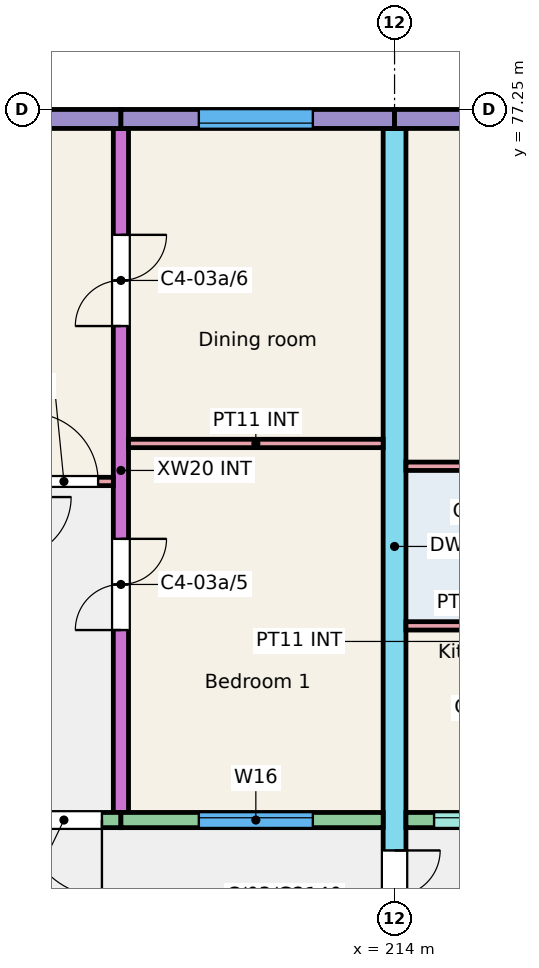
"""IFC4 building model, lengths in metres.
Left out: names, types, materials, properties, quantities, classifications, styles, units other than length and angle.
Written with IfcOpenShell. Run it as: python <this file> out.ifc"""

import sys

from ifc_helpers import new_model, si_unit, direction, frame, frame_2d, origin, place, context, subcontext, project, spatial, rectangle, extrude, element, fill, save


model = new_model("IFC4")
c1 = context("Model", 3, precision=1e-05, world=origin(), true_north=direction((0.0, 1.0)))
c2 = subcontext(c1, "Body", "Model", "MODEL_VIEW")
j1 = project(units=[si_unit("LENGTHUNIT", "METRE"), si_unit("PLANEANGLEUNIT", "RADIAN")], contexts=[c1])
p1 = place(None, origin())
s1 = spatial("IfcSite", under=j1, at=p1, CompositionType="ELEMENT")
p2 = place(p1, origin())
s2 = spatial("IfcBuilding", under=s1, at=p2, CompositionType="ELEMENT")
p3 = place(p2, frame((0.0, 0.0, 9.0)))
s3 = spatial("IfcBuildingStorey", under=s2, at=p3, CompositionType="ELEMENT", Elevation=9.0)
p4 = place(p3, frame((210.4, 68.0, 0.0), z_axis=(0.0, 0.0, 1.0), x_axis=(0.0, 1.0, 0.0)))
e1 = element("IfcWall", 1, at=p4, inside=s3, PredefinedType="SHEAR", context=c2, shape_type="SweptSolid", body=[
    extrude(rectangle(XDim=9.0, YDim=0.2, at=frame_2d((4.5, 0.0))), origin(), (0.0, 0.0, 1.0), 3.0),
])
p5 = place(p4, frame((2.4, 0.0, 0.0)))
e2 = element("IfcOpeningElement", 2, at=p5, cuts=e1, PredefinedType="OPENING", context=c2, shape_type="SweptSolid", body=[
    extrude(rectangle(XDim=1.2, YDim=2.1, at=frame_2d((0.6, 1.05))), frame((0.0, 0.11, 0.0), z_axis=(0.0, -1.0, 0.0), x_axis=(1.0, 0.0, 0.0)), (0.0, 0.0, 1.0), 0.22),
])
p6 = place(p4, frame((6.4, 0.0, 0.0)))
e3 = element("IfcOpeningElement", 3, at=p6, cuts=e1, PredefinedType="OPENING", context=c2, shape_type="SweptSolid", body=[
    extrude(rectangle(XDim=1.2, YDim=2.1, at=frame_2d((0.6, 1.05))), frame((0.0, 0.11, 0.0), z_axis=(0.0, -1.0, 0.0), x_axis=(1.0, 0.0, 0.0)), (0.0, 0.0, 1.0), 0.22),
])
p7 = place(p3, frame((214.0, 66.0, 0.0), z_axis=(0.0, 0.0, 1.0), x_axis=(0.0, 1.0, 0.0)))
e4 = element("IfcWall", 4, at=p7, inside=s3, PredefinedType="SHEAR", context=c2, shape_type="SweptSolid", body=[
    extrude(rectangle(XDim=11.0, YDim=0.3, at=frame_2d((5.5, 0.0))), origin(), (0.0, 0.0, 1.0), 3.0),
])
p8 = place(p7, frame((0.3, 0.0, 0.0)))
e5 = element("IfcOpeningElement", 5, at=p8, cuts=e4, PredefinedType="OPENING", context=c2, shape_type="SweptSolid", body=[
    extrude(rectangle(XDim=1.2, YDim=2.1, at=frame_2d((0.6, 1.05))), frame((0.0, 0.16, 0.0), z_axis=(0.0, -1.0, 0.0), x_axis=(1.0, 0.0, 0.0)), (0.0, 0.0, 1.0), 0.32),
])
p9 = place(p3, frame((206.8, 77.125, 0.0), z_axis=(0.0, 0.0, 1.0), x_axis=(1.0, 0.0, 0.0)))
e6 = element("IfcWall", 6, at=p9, inside=s3, PredefinedType="SOLIDWALL", context=c2, shape_type="SweptSolid", body=[
    extrude(rectangle(XDim=3.6, YDim=0.25, at=frame_2d((1.8, 0.0))), origin(), (0.0, 0.0, 1.0), 3.0),
])
p10 = place(p9, frame((1.05, 0.0, 0.9)))
e7 = element("IfcOpeningElement", 7, at=p10, cuts=e6, PredefinedType="OPENING", context=c2, shape_type="SweptSolid", body=[
    extrude(rectangle(XDim=1.5, YDim=1.5, at=frame_2d((0.75, 0.75))), frame((0.0, 0.135, 0.0), z_axis=(0.0, -1.0, 0.0), x_axis=(1.0, 0.0, 0.0)), (0.0, 0.0, 1.0), 0.27),
])
p11 = place(p3, frame((206.8, 67.9, 0.0), z_axis=(0.0, 0.0, 1.0), x_axis=(1.0, 0.0, 0.0)))
e8 = element("IfcWall", 8, at=p11, inside=s3, PredefinedType="SOLIDWALL", context=c2, shape_type="SweptSolid", body=[
    extrude(rectangle(XDim=3.6, YDim=0.2, at=frame_2d((1.8, 0.0))), origin(), (0.0, 0.0, 1.0), 3.0),
])
p12 = place(p11, frame((0.495, 0.0, 1.1)))
e9 = element("IfcOpeningElement", 9, at=p12, cuts=e8, PredefinedType="OPENING", context=c2, shape_type="SweptSolid", body=[
    extrude(rectangle(XDim=1.2, YDim=1.3, at=frame_2d((0.6, 0.65))), frame((0.0, 0.11, 0.0), z_axis=(0.0, -1.0, 0.0), x_axis=(1.0, 0.0, 0.0)), (0.0, 0.0, 1.0), 0.22),
])
p13 = place(p11, frame((2.35, 0.0, 0.0)))
e10 = element("IfcOpeningElement", 10, at=p13, cuts=e8, PredefinedType="OPENING", context=c2, shape_type="SweptSolid", body=[
    extrude(rectangle(XDim=1.0, YDim=2.1, at=frame_2d((0.5, 1.05))), frame((0.0, 0.11, 0.0), z_axis=(0.0, -1.0, 0.0), x_axis=(1.0, 0.0, 0.0)), (0.0, 0.0, 1.0), 0.22),
])
p14 = place(p3, frame((210.4, 77.125, 0.0), z_axis=(0.0, 0.0, 1.0), x_axis=(1.0, 0.0, 0.0)))
e11 = element("IfcWall", 11, at=p14, inside=s3, PredefinedType="SOLIDWALL", context=c2, shape_type="SweptSolid", body=[
    extrude(rectangle(XDim=3.6, YDim=0.25, at=frame_2d((1.8, 0.0))), origin(), (0.0, 0.0, 1.0), 3.0),
])
p15 = place(p14, frame((1.025, 0.0, 0.9)))
e12 = element("IfcOpeningElement", 12, at=p15, cuts=e11, PredefinedType="OPENING", context=c2, shape_type="SweptSolid", body=[
    extrude(rectangle(XDim=1.5, YDim=1.5, at=frame_2d((0.75, 0.75))), frame((0.0, 0.135, 0.0), z_axis=(0.0, -1.0, 0.0), x_axis=(1.0, 0.0, 0.0)), (0.0, 0.0, 1.0), 0.27),
])
p16 = place(p3, frame((210.4, 67.9, 0.0), z_axis=(0.0, 0.0, 1.0), x_axis=(1.0, 0.0, 0.0)))
e13 = element("IfcWall", 13, at=p16, inside=s3, PredefinedType="SOLIDWALL", context=c2, shape_type="SweptSolid", body=[
    extrude(rectangle(XDim=3.45, YDim=0.2, at=frame_2d((1.725, 0.0))), origin(), (0.0, 0.0, 1.0), 3.0),
])
p17 = place(p16, frame((1.025, 0.0, 0.9)))
e14 = element("IfcOpeningElement", 14, at=p17, cuts=e13, PredefinedType="OPENING", context=c2, shape_type="SweptSolid", body=[
    extrude(rectangle(XDim=1.5, YDim=1.5, at=frame_2d((0.75, 0.75))), frame((0.0, 0.11, 0.0), z_axis=(0.0, -1.0, 0.0), x_axis=(1.0, 0.0, 0.0)), (0.0, 0.0, 1.0), 0.22),
])
p18 = place(p3, frame((214.0, 77.125, 0.0), z_axis=(0.0, 0.0, 1.0), x_axis=(1.0, 0.0, 0.0)))
e15 = element("IfcWall", 15, at=p18, inside=s3, PredefinedType="SOLIDWALL", context=c2, shape_type="SweptSolid", body=[
    extrude(rectangle(XDim=3.6, YDim=0.25, at=frame_2d((1.8, 0.0))), origin(), (0.0, 0.0, 1.0), 3.0),
])
p19 = place(p18, frame((1.075, 0.0, 0.9)))
e16 = element("IfcOpeningElement", 16, at=p19, cuts=e15, PredefinedType="OPENING", context=c2, shape_type="SweptSolid", body=[
    extrude(rectangle(XDim=1.5, YDim=1.5, at=frame_2d((0.75, 0.75))), frame((0.0, 0.135, 0.0), z_axis=(0.0, -1.0, 0.0), x_axis=(1.0, 0.0, 0.0)), (0.0, 0.0, 1.0), 0.27),
])
p20 = place(p3, frame((214.15, 67.9, 0.0), z_axis=(0.0, 0.0, 1.0), x_axis=(1.0, 0.0, 0.0)))
e17 = element("IfcWall", 17, at=p20, inside=s3, PredefinedType="SOLIDWALL", context=c2, shape_type="SweptSolid", body=[
    extrude(rectangle(XDim=3.45, YDim=0.2, at=frame_2d((1.725, 0.0))), origin(), (0.0, 0.0, 1.0), 3.0),
])
p21 = place(p20, frame((0.37, 0.0, 1.1)))
e18 = element("IfcOpeningElement", 18, at=p21, cuts=e17, PredefinedType="OPENING", context=c2, shape_type="SweptSolid", body=[
    extrude(rectangle(XDim=1.2, YDim=1.3, at=frame_2d((0.6, 0.65))), frame((0.0, 0.11, 0.0), z_axis=(0.0, -1.0, 0.0), x_axis=(1.0, 0.0, 0.0)), (0.0, 0.0, 1.0), 0.22),
])
p22 = place(p20, frame((2.2, 0.0, 0.0)))
e19 = element("IfcOpeningElement", 19, at=p22, cuts=e17, PredefinedType="OPENING", context=c2, shape_type="SweptSolid", body=[
    extrude(rectangle(XDim=1.0, YDim=2.1, at=frame_2d((0.5, 1.05))), frame((0.0, 0.11, 0.0), z_axis=(0.0, -1.0, 0.0), x_axis=(1.0, 0.0, 0.0)), (0.0, 0.0, 1.0), 0.22),
])
p23 = place(p3, frame((206.9, 72.355, 0.0), z_axis=(0.0, 0.0, 1.0), x_axis=(1.0, 0.0, 0.0)))
e20 = element("IfcWall", 20, at=p23, inside=s3, PredefinedType="PARTITIONING", context=c2, shape_type="SweptSolid", body=[
    extrude(rectangle(XDim=3.4, YDim=0.11, at=frame_2d((1.7, 0.0))), origin(), (0.0, 0.0, 1.0), 2.8),
])
p24 = place(p23, frame((2.3, 0.0, 0.0)))
e21 = element("IfcOpeningElement", 21, at=p24, cuts=e20, PredefinedType="OPENING", context=c2, shape_type="SweptSolid", body=[
    extrude(rectangle(XDim=0.9, YDim=2.1, at=frame_2d((0.45, 1.05))), frame((0.0, 0.065, 0.0), z_axis=(0.0, -1.0, 0.0), x_axis=(1.0, 0.0, 0.0)), (0.0, 0.0, 1.0), 0.13),
])
p25 = place(p3, frame((210.5, 72.855, 0.0), z_axis=(0.0, 0.0, 1.0), x_axis=(1.0, 0.0, 0.0)))
e22 = element("IfcWall", 22, at=p25, inside=s3, PredefinedType="PARTITIONING", context=c2, shape_type="SweptSolid", body=[
    extrude(rectangle(XDim=3.35, YDim=0.11, at=frame_2d((1.675, 0.0))), origin(), (0.0, 0.0, 1.0), 2.8),
])
p26 = place(p3, frame((214.15, 70.455, 0.0), z_axis=(0.0, 0.0, 1.0), x_axis=(1.0, 0.0, 0.0)))
e23 = element("IfcWall", 23, at=p26, inside=s3, PredefinedType="PARTITIONING", context=c2, shape_type="SweptSolid", body=[
    extrude(rectangle(XDim=1.94, YDim=0.11, at=frame_2d((0.97, 0.0))), origin(), (0.0, 0.0, 1.0), 2.8),
])
p27 = place(p3, frame((214.15, 72.555, 0.0), z_axis=(0.0, 0.0, 1.0), x_axis=(1.0, 0.0, 0.0)))
e24 = element("IfcWall", 24, at=p27, inside=s3, PredefinedType="PARTITIONING", context=c2, shape_type="SweptSolid", body=[
    extrude(rectangle(XDim=3.35, YDim=0.11, at=frame_2d((1.675, 0.0))), origin(), (0.0, 0.0, 1.0), 2.8),
])
p28 = place(p27, frame((2.25, 0.0, 0.0)))
e25 = element("IfcOpeningElement", 25, at=p28, cuts=e24, PredefinedType="OPENING", context=c2, shape_type="SweptSolid", body=[
    extrude(rectangle(XDim=0.9, YDim=2.1, at=frame_2d((0.45, 1.05))), frame((0.0, 0.065, 0.0), z_axis=(0.0, -1.0, 0.0), x_axis=(1.0, 0.0, 0.0)), (0.0, 0.0, 1.0), 0.13),
])
p29 = place(p17, origin())
e26 = element("IfcWindow", 26, at=p29, inside=s3, PartitioningType="SINGLE_PANEL", PredefinedType="WINDOW", context=c2, shape_type="SweptSolid", body=[
    extrude(rectangle(XDim=1.5, YDim=1.5, at=frame_2d((0.75, 0.75))), frame((0.0, 0.06, 0.0), z_axis=(0.0, -1.0, 0.0), x_axis=(1.0, 0.0, 0.0)), (0.0, 0.0, 1.0), 0.06),
])
fill(e14, e26)
p30 = place(p15, origin())
e27 = element("IfcWindow", 27, at=p30, inside=s3, PartitioningType="SINGLE_PANEL", PredefinedType="WINDOW", context=c2, shape_type="SweptSolid", body=[
    extrude(rectangle(XDim=1.5, YDim=1.5, at=frame_2d((0.75, 0.75))), frame((0.0, -0.025, 0.0), z_axis=(0.0, -1.0, 0.0), x_axis=(1.0, 0.0, 0.0)), (0.0, 0.0, 1.0), 0.06),
])
fill(e12, e27)
p31 = place(p21, origin())
e28 = element("IfcWindow", 28, at=p31, inside=s3, PartitioningType="SINGLE_PANEL", PredefinedType="WINDOW", context=c2, shape_type="SweptSolid", body=[
    extrude(rectangle(XDim=1.2, YDim=1.3, at=frame_2d((0.6, 0.65))), frame((0.0, 0.06, 0.0), z_axis=(0.0, -1.0, 0.0), x_axis=(1.0, 0.0, 0.0)), (0.0, 0.0, 1.0), 0.06),
])
fill(e18, e28)
p32 = place(p13, origin())
e29 = element("IfcDoor", 29, at=p32, inside=s3, OperationType="SINGLE_SWING_RIGHT", PredefinedType="DOOR", context=c2, shape_type="SweptSolid", body=[
    extrude(rectangle(XDim=1.0, YDim=2.1, at=frame_2d((0.5, 1.05))), frame((0.0, 0.025, 0.0), z_axis=(0.0, -1.0, 0.0), x_axis=(1.0, 0.0, 0.0)), (0.0, 0.0, 1.0), 0.05),
])
fill(e10, e29)
p33 = place(p24, origin())
e30 = element("IfcDoor", 30, at=p33, inside=s3, OperationType="SINGLE_SWING_LEFT", PredefinedType="DOOR", context=c2, shape_type="SweptSolid", body=[
    extrude(rectangle(XDim=0.9, YDim=2.1, at=frame_2d((0.45, 1.05))), frame((0.0, 0.025, 0.0), z_axis=(0.0, -1.0, 0.0), x_axis=(1.0, 0.0, 0.0)), (0.0, 0.0, 1.0), 0.05),
])
fill(e21, e30)
p34 = place(p5, origin())
e31 = element("IfcDoor", 31, at=p34, inside=s3, OperationType="DOUBLE_DOOR_SINGLE_SWING", PredefinedType="DOOR", context=c2, shape_type="SweptSolid", body=[
    extrude(rectangle(XDim=1.2, YDim=2.1, at=frame_2d((0.6, 1.05))), frame((0.0, 0.025, 0.0), z_axis=(0.0, -1.0, 0.0), x_axis=(1.0, 0.0, 0.0)), (0.0, 0.0, 1.0), 0.05),
])
fill(e2, e31)
p35 = place(p6, origin())
e32 = element("IfcDoor", 32, at=p35, inside=s3, OperationType="DOUBLE_DOOR_SINGLE_SWING", PredefinedType="DOOR", context=c2, shape_type="SweptSolid", body=[
    extrude(rectangle(XDim=1.2, YDim=2.1, at=frame_2d((0.6, 1.05))), frame((0.0, 0.025, 0.0), z_axis=(0.0, -1.0, 0.0), x_axis=(1.0, 0.0, 0.0)), (0.0, 0.0, 1.0), 0.05),
])
fill(e3, e32)
p36 = place(p8, origin())
e33 = element("IfcDoor", 33, at=p36, inside=s3, OperationType="DOUBLE_DOOR_SINGLE_SWING", PredefinedType="DOOR", context=c2, shape_type="SweptSolid", body=[
    extrude(rectangle(XDim=1.2, YDim=2.1, at=frame_2d((0.6, 1.05))), frame((0.0, 0.025, 0.0), z_axis=(0.0, -1.0, 0.0), x_axis=(1.0, 0.0, 0.0)), (0.0, 0.0, 1.0), 0.05),
])
fill(e5, e33)
save(model, sys.argv[1])
